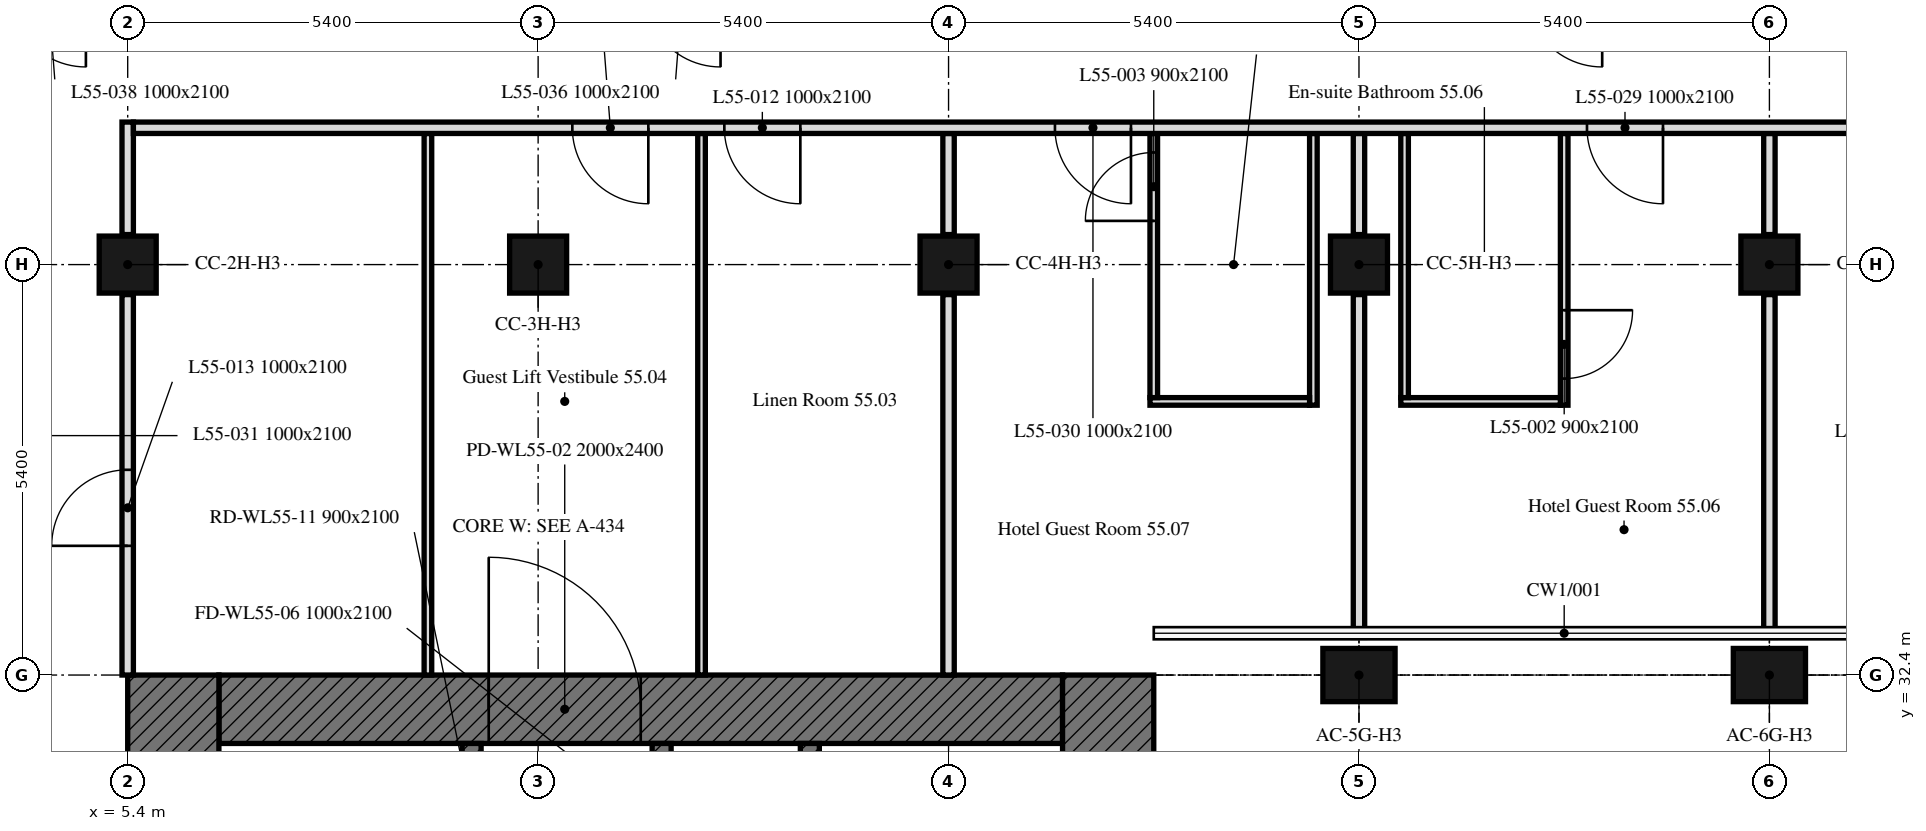
"""IFC4 building model, lengths in metres.
Left out: names, types, materials, properties, quantities, classifications, styles, units other than length and angle.
Written with IfcOpenShell. Run it as: python <this file> out.ifc"""

import sys

from ifc_helpers import new_model, si_unit, direction, frame, frame_2d, origin, origin_2d, place, context, subcontext, project, spatial, rectangle, extrude, element, fill, save


model = new_model("IFC4")
c1 = context("Model", 3, precision=1e-05, world=origin(), true_north=direction((0.0, 1.0)))
c2 = subcontext(c1, "Body", "Model", "MODEL_VIEW")
j1 = project(units=[si_unit("LENGTHUNIT", "METRE"), si_unit("PLANEANGLEUNIT", "RADIAN")], contexts=[c1])
p1 = place(None, origin())
s1 = spatial("IfcSite", under=j1, at=p1, CompositionType="ELEMENT")
p2 = place(p1, origin())
s2 = spatial("IfcBuilding", under=s1, at=p2, CompositionType="ELEMENT")
p3 = place(p2, frame((0.0, 0.0, 220.3)))
s3 = spatial("IfcBuildingStorey", under=s2, at=p3, CompositionType="ELEMENT", Elevation=220.3)
for number, where, z_axis, x_axis in (
    (1, (21.6, 32.4, 0.0), (0.0, 0.0, 1.0), (1.0, 0.0, 0.0)),
    (2, (27.0, 32.4, 0.0), (0.0, 0.0, 1.0), (1.0, 0.0, 0.0)),
):
    element("IfcColumn", number, at=place(p3, frame(where, z_axis=z_axis, x_axis=x_axis)), inside=s3, PredefinedType="COLUMN", context=c2, shape_type="SweptSolid", body=[
        extrude(rectangle(XDim=0.95, YDim=0.7, at=origin_2d()), origin(), (0.0, 0.0, 1.0), 3.0),
    ])
for number, where, z_axis, x_axis in (
    (3, (5.4, 37.8, 0.0), (0.0, 0.0, 1.0), (1.0, 0.0, 0.0)),
    (4, (10.8, 37.8, 0.0), (0.0, 0.0, 1.0), (1.0, 0.0, 0.0)),
    (5, (16.2, 37.8, 0.0), (0.0, 0.0, 1.0), (1.0, 0.0, 0.0)),
    (6, (21.6, 37.8, 0.0), (0.0, 0.0, 1.0), (1.0, 0.0, 0.0)),
    (7, (27.0, 37.8, 0.0), (0.0, 0.0, 1.0), (1.0, 0.0, 0.0)),
):
    element("IfcColumn", number, at=place(p3, frame(where, z_axis=z_axis, x_axis=x_axis)), inside=s3, PredefinedType="COLUMN", context=c2, shape_type="SweptSolid", body=[
        extrude(rectangle(XDim=0.75, YDim=0.75, at=origin_2d()), origin(), (0.0, 0.0, 1.0), 3.0),
    ])
p4 = place(p3, frame((6.6, 31.95, 0.0), z_axis=(0.0, 0.0, 1.0), x_axis=(1.0, 0.0, 0.0)))
e8 = element("IfcWall", 8, at=p4, inside=s3, PredefinedType="SOLIDWALL", context=c2, shape_type="SweptSolid", body=[
    extrude(rectangle(XDim=11.1, YDim=0.9, at=frame_2d((5.55, 0.0))), origin(), (0.0, 0.0, 1.0), 3.0),
])
p5 = place(p4, frame((3.55, 0.0, 0.0)))
e9 = element("IfcOpeningElement", 9, at=p5, cuts=e8, PredefinedType="OPENING", context=c2, shape_type="SweptSolid", body=[
    extrude(rectangle(XDim=2.0, YDim=2.4, at=frame_2d((1.0, 1.2))), frame((0.0, 0.45, 0.0), z_axis=(0.0, -1.0, 0.0), x_axis=(1.0, 0.0, 0.0)), (0.0, 0.0, 1.0), 0.9),
])
for number, where, z_axis, x_axis in (
    (10, (6.0, 16.2, 0.0), (0.0, 0.0, 1.0), (0.0, 1.0, 0.0)),
    (11, (18.3, 32.4, 0.0), (0.0, 0.0, 1.0), (0.0, -1.0, 0.0)),
):
    element("IfcWall", number, at=place(p3, frame(where, z_axis=z_axis, x_axis=x_axis)), inside=s3, PredefinedType="SOLIDWALL", context=c2, shape_type="SweptSolid", body=[
        extrude(rectangle(XDim=16.2, YDim=1.2, at=frame_2d((8.1, 0.0))), origin(), (0.0, 0.0, 1.0), 3.0),
    ])
p6 = place(p3, frame((9.925, 17.1, 0.0), z_axis=(0.0, 0.0, 1.0), x_axis=(0.0, 1.0, 0.0)))
e12 = element("IfcWall", 12, at=p6, inside=s3, PredefinedType="SOLIDWALL", context=c2, shape_type="SweptSolid", body=[
    extrude(rectangle(XDim=14.4, YDim=0.25, at=frame_2d((7.2, 0.0))), origin(), (0.0, 0.0, 1.0), 3.0),
])
p7 = place(p6, frame((4.6, 0.0, 0.0)))
e13 = element("IfcOpeningElement", 13, at=p7, cuts=e12, PredefinedType="OPENING", context=c2, shape_type="SweptSolid", body=[
    extrude(rectangle(XDim=1.0, YDim=2.1, at=frame_2d((0.5, 1.05))), frame((0.0, 0.125, 0.0), z_axis=(0.0, -1.0, 0.0), x_axis=(1.0, 0.0, 0.0)), (0.0, 0.0, 1.0), 0.25),
])
p8 = place(p6, frame((7.062, 0.0, 0.0)))
e14 = element("IfcOpeningElement", 14, at=p8, cuts=e12, PredefinedType="OPENING", context=c2, shape_type="SweptSolid", body=[
    extrude(rectangle(XDim=1.2, YDim=2.1, at=frame_2d((0.6, 1.05))), frame((0.0, 0.125, 0.0), z_axis=(0.0, -1.0, 0.0), x_axis=(1.0, 0.0, 0.0)), (0.0, 0.0, 1.0), 0.25),
])
p9 = place(p6, frame((9.472, 0.0, 0.0)))
e15 = element("IfcOpeningElement", 15, at=p9, cuts=e12, PredefinedType="OPENING", context=c2, shape_type="SweptSolid", body=[
    extrude(rectangle(XDim=0.9, YDim=2.1, at=frame_2d((0.45, 1.05))), frame((0.0, 0.125, 0.0), z_axis=(0.0, -1.0, 0.0), x_axis=(1.0, 0.0, 0.0)), (0.0, 0.0, 1.0), 0.25),
])
p10 = place(p6, frame((11.159, 0.0, 0.0)))
e16 = element("IfcOpeningElement", 16, at=p10, cuts=e12, PredefinedType="OPENING", context=c2, shape_type="SweptSolid", body=[
    extrude(rectangle(XDim=0.9, YDim=2.1, at=frame_2d((0.45, 1.05))), frame((0.0, 0.125, 0.0), z_axis=(0.0, -1.0, 0.0), x_axis=(1.0, 0.0, 0.0)), (0.0, 0.0, 1.0), 0.25),
])
p11 = place(p6, frame((13.1, 0.0, 0.0)))
e17 = element("IfcOpeningElement", 17, at=p11, cuts=e12, PredefinedType="OPENING", context=c2, shape_type="SweptSolid", body=[
    extrude(rectangle(XDim=0.9, YDim=2.1, at=frame_2d((0.45, 1.05))), frame((0.0, 0.125, 0.0), z_axis=(0.0, -1.0, 0.0), x_axis=(1.0, 0.0, 0.0)), (0.0, 0.0, 1.0), 0.25),
])
p12 = place(p3, frame((14.375, 17.1, 0.0), z_axis=(0.0, 0.0, 1.0), x_axis=(0.0, 1.0, 0.0)))
e18 = element("IfcWall", 18, at=p12, inside=s3, PredefinedType="SOLIDWALL", context=c2, shape_type="SweptSolid", body=[
    extrude(rectangle(XDim=14.4, YDim=0.25, at=frame_2d((7.2, 0.0))), origin(), (0.0, 0.0, 1.0), 3.0),
])
p13 = place(p12, frame((13.15, 0.0, 0.0)))
e19 = element("IfcOpeningElement", 19, at=p13, cuts=e18, PredefinedType="OPENING", context=c2, shape_type="SweptSolid", body=[
    extrude(rectangle(XDim=1.0, YDim=2.1, at=frame_2d((0.5, 1.05))), frame((0.0, 0.125, 0.0), z_axis=(0.0, -1.0, 0.0), x_axis=(1.0, 0.0, 0.0)), (0.0, 0.0, 1.0), 0.25),
])
p14 = place(p12, frame((0.6, 0.0, 0.0)))
e20 = element("IfcOpeningElement", 20, at=p14, cuts=e18, PredefinedType="OPENING", context=c2, shape_type="SweptSolid", body=[
    extrude(rectangle(XDim=1.1, YDim=2.1, at=frame_2d((0.55, 1.05))), frame((0.0, 0.125, 0.0), z_axis=(0.0, -1.0, 0.0), x_axis=(1.0, 0.0, 0.0)), (0.0, 0.0, 1.0), 0.25),
])
p15 = place(p12, frame((3.25, 0.0, 0.0)))
e21 = element("IfcOpeningElement", 21, at=p15, cuts=e18, PredefinedType="OPENING", context=c2, shape_type="SweptSolid", body=[
    extrude(rectangle(XDim=0.9, YDim=2.1, at=frame_2d((0.45, 1.05))), frame((0.0, 0.125, 0.0), z_axis=(0.0, -1.0, 0.0), x_axis=(1.0, 0.0, 0.0)), (0.0, 0.0, 1.0), 0.25),
])
p16 = place(p3, frame((12.425, 29.4, 0.0), z_axis=(0.0, 0.0, 1.0), x_axis=(0.0, 1.0, 0.0)))
e22 = element("IfcWall", 22, at=p16, inside=s3, PredefinedType="SOLIDWALL", context=c2, shape_type="SweptSolid", body=[
    extrude(rectangle(XDim=2.1, YDim=0.25, at=frame_2d((1.05, 0.0))), origin(), (0.0, 0.0, 1.0), 3.0),
])
p17 = place(p16, frame((0.5, 0.0, 0.0)))
e23 = element("IfcOpeningElement", 23, at=p17, cuts=e22, PredefinedType="OPENING", context=c2, shape_type="SweptSolid", body=[
    extrude(rectangle(XDim=1.0, YDim=2.1, at=frame_2d((0.5, 1.05))), frame((0.0, 0.125, 0.0), z_axis=(0.0, -1.0, 0.0), x_axis=(1.0, 0.0, 0.0)), (0.0, 0.0, 1.0), 0.25),
])
p18 = place(p3, frame((27.0, 39.525, 0.0), z_axis=(0.0, 0.0, 1.0), x_axis=(0.0, -1.0, 0.0)))
e24 = element("IfcWall", 24, at=p18, inside=s3, PredefinedType="PARTITIONING", context=c2, shape_type="SweptSolid", body=[
    extrude(rectangle(XDim=1.33, YDim=0.15, at=frame_2d((0.665, 0.0))), origin(), (0.0, 0.0, 1.0), 2.4),
])
p19 = place(p3, frame((27.0, 37.405, 0.0), z_axis=(0.0, 0.0, 1.0), x_axis=(0.0, -1.0, 0.0)))
e25 = element("IfcWall", 25, at=p19, inside=s3, PredefinedType="PARTITIONING", context=c2, shape_type="SweptSolid", body=[
    extrude(rectangle(XDim=4.51, YDim=0.15, at=frame_2d((2.255, 0.0))), origin(), (0.0, 0.0, 1.0), 2.4),
])
p20 = place(p3, frame((24.3, 39.525, 0.0), z_axis=(0.0, 0.0, 1.0), x_axis=(0.0, -1.0, 0.0)))
e26 = element("IfcWall", 26, at=p20, inside=s3, PredefinedType="PARTITIONING", context=c2, shape_type="SweptSolid", body=[
    extrude(rectangle(XDim=3.575, YDim=0.1, at=frame_2d((1.788, 0.0))), origin(), (0.0, 0.0, 1.0), 3.0),
])
p21 = place(p20, frame((2.325, 0.0, 0.0)))
e27 = element("IfcOpeningElement", 27, at=p21, cuts=e26, PredefinedType="OPENING", context=c2, shape_type="SweptSolid", body=[
    extrude(rectangle(XDim=0.9, YDim=2.1, at=frame_2d((0.45, 1.05))), frame((0.0, 0.05, 0.0), z_axis=(0.0, -1.0, 0.0), x_axis=(1.0, 0.0, 0.0)), (0.0, 0.0, 1.0), 0.1),
])
p22 = place(p3, frame((24.25, 36.0, 0.0), z_axis=(0.0, 0.0, 1.0), x_axis=(-1.0, 0.0, 0.0)))
e28 = element("IfcWall", 28, at=p22, inside=s3, PredefinedType="PARTITIONING", context=c2, shape_type="SweptSolid", body=[
    extrude(rectangle(XDim=2.1, YDim=0.1, at=frame_2d((1.05, 0.0))), origin(), (0.0, 0.0, 1.0), 3.0),
])
p23 = place(p3, frame((22.2, 36.05, 0.0), z_axis=(0.0, 0.0, 1.0), x_axis=(0.0, 1.0, 0.0)))
e29 = element("IfcWall", 29, at=p23, inside=s3, PredefinedType="PARTITIONING", context=c2, shape_type="SweptSolid", body=[
    extrude(rectangle(XDim=3.475, YDim=0.1, at=frame_2d((1.737, 0.0))), origin(), (0.0, 0.0, 1.0), 3.0),
])
p24 = place(p3, frame((21.6, 39.525, 0.0), z_axis=(0.0, 0.0, 1.0), x_axis=(0.0, -1.0, 0.0)))
e30 = element("IfcWall", 30, at=p24, inside=s3, PredefinedType="PARTITIONING", context=c2, shape_type="SweptSolid", body=[
    extrude(rectangle(XDim=1.33, YDim=0.15, at=frame_2d((0.665, 0.0))), origin(), (0.0, 0.0, 1.0), 2.4),
])
p25 = place(p3, frame((21.6, 37.405, 0.0), z_axis=(0.0, 0.0, 1.0), x_axis=(0.0, -1.0, 0.0)))
e31 = element("IfcWall", 31, at=p25, inside=s3, PredefinedType="PARTITIONING", context=c2, shape_type="SweptSolid", body=[
    extrude(rectangle(XDim=4.51, YDim=0.15, at=frame_2d((2.255, 0.0))), origin(), (0.0, 0.0, 1.0), 2.4),
])
p26 = place(p3, frame((21.0, 39.525, 0.0), z_axis=(0.0, 0.0, 1.0), x_axis=(0.0, -1.0, 0.0)))
e32 = element("IfcWall", 32, at=p26, inside=s3, PredefinedType="PARTITIONING", context=c2, shape_type="SweptSolid", body=[
    extrude(rectangle(XDim=3.575, YDim=0.1, at=frame_2d((1.788, 0.0))), origin(), (0.0, 0.0, 1.0), 3.0),
])
p27 = place(p3, frame((20.95, 36.0, 0.0), z_axis=(0.0, 0.0, 1.0), x_axis=(-1.0, 0.0, 0.0)))
e33 = element("IfcWall", 33, at=p27, inside=s3, PredefinedType="PARTITIONING", context=c2, shape_type="SweptSolid", body=[
    extrude(rectangle(XDim=2.1, YDim=0.1, at=frame_2d((1.05, 0.0))), origin(), (0.0, 0.0, 1.0), 3.0),
])
p28 = place(p3, frame((18.9, 36.05, 0.0), z_axis=(0.0, 0.0, 1.0), x_axis=(0.0, 1.0, 0.0)))
e34 = element("IfcWall", 34, at=p28, inside=s3, PredefinedType="PARTITIONING", context=c2, shape_type="SweptSolid", body=[
    extrude(rectangle(XDim=3.475, YDim=0.1, at=frame_2d((1.737, 0.0))), origin(), (0.0, 0.0, 1.0), 3.0),
])
p29 = place(p28, frame((2.325, 0.0, 0.0)))
e35 = element("IfcOpeningElement", 35, at=p29, cuts=e34, PredefinedType="OPENING", context=c2, shape_type="SweptSolid", body=[
    extrude(rectangle(XDim=0.9, YDim=2.1, at=frame_2d((0.45, 1.05))), frame((0.0, 0.05, 0.0), z_axis=(0.0, -1.0, 0.0), x_axis=(1.0, 0.0, 0.0)), (0.0, 0.0, 1.0), 0.1),
])
p30 = place(p3, frame((16.2, 39.525, 0.0), z_axis=(0.0, 0.0, 1.0), x_axis=(0.0, -1.0, 0.0)))
e36 = element("IfcWall", 36, at=p30, inside=s3, PredefinedType="PARTITIONING", context=c2, shape_type="SweptSolid", body=[
    extrude(rectangle(XDim=1.33, YDim=0.15, at=frame_2d((0.665, 0.0))), origin(), (0.0, 0.0, 1.0), 2.4),
])
p31 = place(p3, frame((16.2, 37.405, 0.0), z_axis=(0.0, 0.0, 1.0), x_axis=(0.0, -1.0, 0.0)))
e37 = element("IfcWall", 37, at=p31, inside=s3, PredefinedType="PARTITIONING", context=c2, shape_type="SweptSolid", body=[
    extrude(rectangle(XDim=5.005, YDim=0.15, at=frame_2d((2.502, 0.0))), origin(), (0.0, 0.0, 1.0), 2.4),
])
for number, where, z_axis, x_axis in (
    (38, (12.95, 32.4, 0.0), (0.0, 0.0, 1.0), (0.0, 1.0, 0.0)),
    (39, (9.35, 39.525, 0.0), (0.0, 0.0, 1.0), (0.0, -1.0, 0.0)),
):
    element("IfcWall", number, at=place(p3, frame(where, z_axis=z_axis, x_axis=x_axis)), inside=s3, PredefinedType="PARTITIONING", context=c2, shape_type="SweptSolid", body=[
        extrude(rectangle(XDim=7.125, YDim=0.1, at=frame_2d((3.562, 0.0))), origin(), (0.0, 0.0, 1.0), 2.4),
    ])
p32 = place(p3, frame((5.4, 32.4, 0.0), z_axis=(0.0, 0.0, 1.0), x_axis=(0.0, 1.0, 0.0)))
e40 = element("IfcWall", 40, at=p32, inside=s3, PredefinedType="PARTITIONING", context=c2, shape_type="SweptSolid", body=[
    extrude(rectangle(XDim=5.005, YDim=0.15, at=frame_2d((2.502, 0.0))), origin(), (0.0, 0.0, 1.0), 3.0),
])
p33 = place(p32, frame((1.7, 0.0, 0.0)))
e41 = element("IfcOpeningElement", 41, at=p33, cuts=e40, PredefinedType="OPENING", context=c2, shape_type="SweptSolid", body=[
    extrude(rectangle(XDim=1.0, YDim=2.1, at=frame_2d((0.5, 1.05))), frame((0.0, 0.075, 0.0), z_axis=(0.0, -1.0, 0.0), x_axis=(1.0, 0.0, 0.0)), (0.0, 0.0, 1.0), 0.15),
])
p34 = place(p3, frame((5.4, 38.195, 0.0), z_axis=(0.0, 0.0, 1.0), x_axis=(0.0, 1.0, 0.0)))
e42 = element("IfcWall", 42, at=p34, inside=s3, PredefinedType="PARTITIONING", context=c2, shape_type="SweptSolid", body=[
    extrude(rectangle(XDim=1.48, YDim=0.15, at=frame_2d((0.74, 0.0))), origin(), (0.0, 0.0, 1.0), 3.0),
])
p35 = place(p3, frame((41.374, 39.6, 0.0), z_axis=(0.0, 0.0, 1.0), x_axis=(-1.0, 0.0, 0.0)))
e43 = element("IfcWall", 43, at=p35, inside=s3, PredefinedType="PARTITIONING", context=c2, shape_type="SweptSolid", body=[
    extrude(rectangle(XDim=35.899, YDim=0.15, at=frame_2d((17.949, 0.0))), origin(), (0.0, 0.0, 1.0), 2.4),
])
p36 = place(p35, frame((0.25, 0.0, 0.0)))
e44 = element("IfcOpeningElement", 44, at=p36, cuts=e43, PredefinedType="OPENING", context=c2, shape_type="SweptSolid", body=[
    extrude(rectangle(XDim=1.0, YDim=2.1, at=frame_2d((0.5, 1.05))), frame((0.0, 0.075, 0.0), z_axis=(0.0, -1.0, 0.0), x_axis=(1.0, 0.0, 0.0)), (0.0, 0.0, 1.0), 0.15),
])
p37 = place(p35, frame((27.124, 0.0, 0.0)))
e45 = element("IfcOpeningElement", 45, at=p37, cuts=e43, PredefinedType="OPENING", context=c2, shape_type="SweptSolid", body=[
    extrude(rectangle(XDim=1.0, YDim=2.1, at=frame_2d((0.5, 1.05))), frame((0.0, 0.075, 0.0), z_axis=(0.0, -1.0, 0.0), x_axis=(1.0, 0.0, 0.0)), (0.0, 0.0, 1.0), 0.15),
])
p38 = place(p35, frame((6.024, 0.0, 0.0)))
e46 = element("IfcOpeningElement", 46, at=p38, cuts=e43, PredefinedType="OPENING", context=c2, shape_type="SweptSolid", body=[
    extrude(rectangle(XDim=1.0, YDim=2.1, at=frame_2d((0.5, 1.05))), frame((0.0, 0.075, 0.0), z_axis=(0.0, -1.0, 0.0), x_axis=(1.0, 0.0, 0.0)), (0.0, 0.0, 1.0), 0.15),
])
p39 = place(p35, frame((11.974, 0.0, 0.0)))
e47 = element("IfcOpeningElement", 47, at=p39, cuts=e43, PredefinedType="OPENING", context=c2, shape_type="SweptSolid", body=[
    extrude(rectangle(XDim=1.0, YDim=2.1, at=frame_2d((0.5, 1.05))), frame((0.0, 0.075, 0.0), z_axis=(0.0, -1.0, 0.0), x_axis=(1.0, 0.0, 0.0)), (0.0, 0.0, 1.0), 0.15),
])
p40 = place(p35, frame((15.774, 0.0, 0.0)))
e48 = element("IfcOpeningElement", 48, at=p40, cuts=e43, PredefinedType="OPENING", context=c2, shape_type="SweptSolid", body=[
    extrude(rectangle(XDim=1.0, YDim=2.1, at=frame_2d((0.5, 1.05))), frame((0.0, 0.075, 0.0), z_axis=(0.0, -1.0, 0.0), x_axis=(1.0, 0.0, 0.0)), (0.0, 0.0, 1.0), 0.15),
])
p41 = place(p35, frame((22.774, 0.0, 0.0)))
e49 = element("IfcOpeningElement", 49, at=p41, cuts=e43, PredefinedType="OPENING", context=c2, shape_type="SweptSolid", body=[
    extrude(rectangle(XDim=1.0, YDim=2.1, at=frame_2d((0.5, 1.05))), frame((0.0, 0.075, 0.0), z_axis=(0.0, -1.0, 0.0), x_axis=(1.0, 0.0, 0.0)), (0.0, 0.0, 1.0), 0.15),
])
p42 = place(p35, frame((3.754, 0.0, 0.0)))
e50 = element("IfcOpeningElement", 50, at=p42, cuts=e43, PredefinedType="OPENING", context=c2, shape_type="SweptSolid", body=[
    extrude(rectangle(XDim=1.8, YDim=2.4, at=frame_2d((0.9, 1.2))), frame((0.0, 0.075, 0.0), z_axis=(0.0, -1.0, 0.0), x_axis=(1.0, 0.0, 0.0)), (0.0, 0.0, 1.0), 0.15),
])
p43 = place(p35, frame((29.124, 0.0, 0.0)))
e51 = element("IfcOpeningElement", 51, at=p43, cuts=e43, PredefinedType="OPENING", context=c2, shape_type="SweptSolid", body=[
    extrude(rectangle(XDim=1.0, YDim=2.1, at=frame_2d((0.5, 1.05))), frame((0.0, 0.075, 0.0), z_axis=(0.0, -1.0, 0.0), x_axis=(1.0, 0.0, 0.0)), (0.0, 0.0, 1.0), 0.15),
])
p44 = place(p5, origin())
e52 = element("IfcDoor", 52, at=p44, inside=s3, OperationType="DOUBLE_DOOR_SINGLE_SWING", PredefinedType="DOOR", context=c2, shape_type="SweptSolid", body=[
    extrude(rectangle(XDim=2.0, YDim=2.4, at=frame_2d((1.0, 1.2))), frame((0.0, 0.025, 0.0), z_axis=(0.0, -1.0, 0.0), x_axis=(1.0, 0.0, 0.0)), (0.0, 0.0, 1.0), 0.05),
])
fill(e9, e52)
p45 = place(p21, origin())
e53 = element("IfcDoor", 53, at=p45, inside=s3, OperationType="SINGLE_SWING_LEFT", PredefinedType="DOOR", context=c2, shape_type="SweptSolid", body=[
    extrude(rectangle(XDim=0.9, YDim=2.1, at=frame_2d((0.45, 1.05))), frame((0.0, 0.025, 0.0), z_axis=(0.0, -1.0, 0.0), x_axis=(1.0, 0.0, 0.0)), (0.0, 0.0, 1.0), 0.05),
])
fill(e27, e53)
p46 = place(p29, origin())
e54 = element("IfcDoor", 54, at=p46, inside=s3, OperationType="SINGLE_SWING_RIGHT", PredefinedType="DOOR", context=c2, shape_type="SweptSolid", body=[
    extrude(rectangle(XDim=0.9, YDim=2.1, at=frame_2d((0.45, 1.05))), frame((0.0, 0.025, 0.0), z_axis=(0.0, -1.0, 0.0), x_axis=(1.0, 0.0, 0.0)), (0.0, 0.0, 1.0), 0.05),
])
fill(e35, e54)
p47 = place(p37, origin())
e55 = element("IfcDoor", 55, at=p47, inside=s3, OperationType="SINGLE_SWING_RIGHT", PredefinedType="DOOR", context=c2, shape_type="SweptSolid", body=[
    extrude(rectangle(XDim=1.0, YDim=2.1, at=frame_2d((0.5, 1.05))), frame((0.0, 0.025, 0.0), z_axis=(0.0, -1.0, 0.0), x_axis=(1.0, 0.0, 0.0)), (0.0, 0.0, 1.0), 0.05),
])
fill(e45, e55)
p48 = place(p33, origin())
e56 = element("IfcDoor", 56, at=p48, inside=s3, OperationType="SINGLE_SWING_LEFT", PredefinedType="DOOR", context=c2, shape_type="SweptSolid", body=[
    extrude(rectangle(XDim=1.0, YDim=2.1, at=frame_2d((0.5, 1.05))), frame((0.0, 0.025, 0.0), z_axis=(0.0, -1.0, 0.0), x_axis=(1.0, 0.0, 0.0)), (0.0, 0.0, 1.0), 0.05),
])
fill(e41, e56)
p49 = place(p40, origin())
e57 = element("IfcDoor", 57, at=p49, inside=s3, OperationType="SINGLE_SWING_RIGHT", PredefinedType="DOOR", context=c2, shape_type="SweptSolid", body=[
    extrude(rectangle(XDim=1.0, YDim=2.1, at=frame_2d((0.5, 1.05))), frame((0.0, 0.025, 0.0), z_axis=(0.0, -1.0, 0.0), x_axis=(1.0, 0.0, 0.0)), (0.0, 0.0, 1.0), 0.05),
])
fill(e48, e57)
p50 = place(p41, origin())
e58 = element("IfcDoor", 58, at=p50, inside=s3, OperationType="SINGLE_SWING_LEFT", PredefinedType="DOOR", context=c2, shape_type="SweptSolid", body=[
    extrude(rectangle(XDim=1.0, YDim=2.1, at=frame_2d((0.5, 1.05))), frame((0.0, 0.025, 0.0), z_axis=(0.0, -1.0, 0.0), x_axis=(1.0, 0.0, 0.0)), (0.0, 0.0, 1.0), 0.05),
])
fill(e49, e58)
p51 = place(p43, origin())
e59 = element("IfcDoor", 59, at=p51, inside=s3, OperationType="SINGLE_SWING_LEFT", PredefinedType="DOOR", context=c2, shape_type="SweptSolid", body=[
    extrude(rectangle(XDim=1.0, YDim=2.1, at=frame_2d((0.5, 1.05))), frame((0.0, 0.025, 0.0), z_axis=(0.0, -1.0, 0.0), x_axis=(1.0, 0.0, 0.0)), (0.0, 0.0, 1.0), 0.05),
])
fill(e51, e59)
save(model, sys.argv[1])
